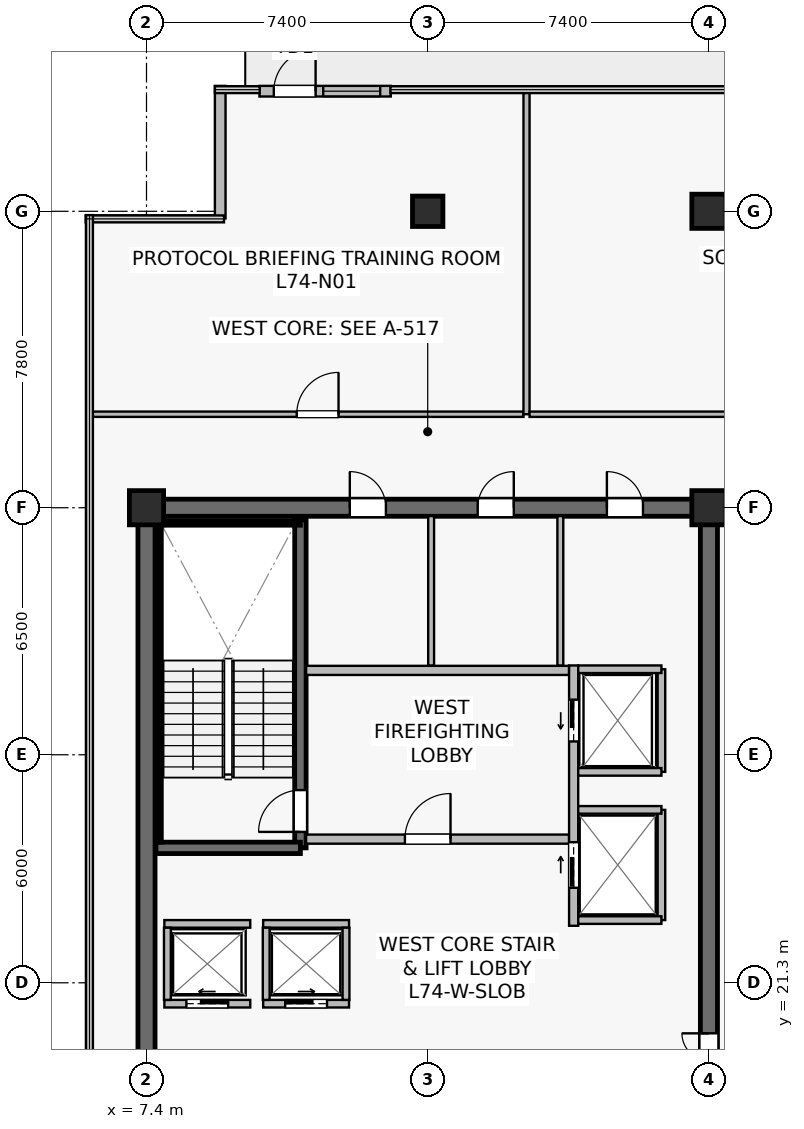
"""IFC4 building model, lengths in metres.
Left out: names, types, materials, properties, quantities, classifications, styles, units other than length and angle.
Written with IfcOpenShell. Run it as: python <this file> out.ifc"""

import sys

from ifc_helpers import new_model, si_unit, direction, frame, frame_2d, origin, origin_2d, place, context, subcontext, project, spatial, rectangle, extrude, source, transform, mapped, element, fill, save


model = new_model("IFC4")
c1 = context("Model", 3, precision=1e-05, world=origin(), true_north=direction((0.0, 1.0)))
c2 = subcontext(c1, "Body", "Model", "MODEL_VIEW")
j1 = project(units=[si_unit("LENGTHUNIT", "METRE"), si_unit("PLANEANGLEUNIT", "RADIAN")], contexts=[c1])
p1 = place(None, origin())
s1 = spatial("IfcSite", under=j1, at=p1, CompositionType="ELEMENT")
p2 = place(p1, origin())
s2 = spatial("IfcBuilding", under=s1, at=p2, CompositionType="ELEMENT")
p3 = place(p2, frame((0.0, 0.0, 310.2)))
s3 = spatial("IfcBuildingStorey", under=s2, at=p3, CompositionType="ELEMENT", Elevation=310.2)
p4 = place(p3, frame((7.175, 33.8, 0.0), z_axis=(0.0, 0.0, 1.0), x_axis=(1.0, 0.0, 0.0)))
e1 = element("IfcWall", 1, at=p4, inside=s3, PredefinedType="SHEAR", context=c2, shape_type="SweptSolid", body=[
    extrude(rectangle(XDim=15.25, YDim=0.45, at=frame_2d((7.625, 0.0))), origin(), (0.0, 0.0, 1.0), 3.9),
])
p5 = place(p4, frame((5.575, 0.0, 0.0)))
e2 = element("IfcOpeningElement", 2, at=p5, cuts=e1, PredefinedType="OPENING", context=c2, shape_type="SweptSolid", body=[
    extrude(rectangle(XDim=0.95, YDim=2.15, at=frame_2d((0.475, 1.075))), frame((0.0, 0.235, 0.0), z_axis=(0.0, -1.0, 0.0), x_axis=(1.0, 0.0, 0.0)), (0.0, 0.0, 1.0), 0.47),
])
p6 = place(p4, frame((8.94, 0.0, 0.0)))
e3 = element("IfcOpeningElement", 3, at=p6, cuts=e1, PredefinedType="OPENING", context=c2, shape_type="SweptSolid", body=[
    extrude(rectangle(XDim=0.95, YDim=2.15, at=frame_2d((0.475, 1.075))), frame((0.0, 0.235, 0.0), z_axis=(0.0, -1.0, 0.0), x_axis=(1.0, 0.0, 0.0)), (0.0, 0.0, 1.0), 0.47),
])
p7 = place(p4, frame((12.34, 0.0, 0.0)))
e4 = element("IfcOpeningElement", 4, at=p7, cuts=e1, PredefinedType="OPENING", context=c2, shape_type="SweptSolid", body=[
    extrude(rectangle(XDim=0.95, YDim=2.15, at=frame_2d((0.475, 1.075))), frame((0.0, 0.235, 0.0), z_axis=(0.0, -1.0, 0.0), x_axis=(1.0, 0.0, 0.0)), (0.0, 0.0, 1.0), 0.47),
])
p8 = place(p3, frame((7.4, 15.025, 0.0), z_axis=(0.0, 0.0, 1.0), x_axis=(0.0, 1.0, 0.0)))
e5 = element("IfcWall", 5, at=p8, inside=s3, PredefinedType="SHEAR", context=c2, shape_type="SweptSolid", body=[
    extrude(rectangle(XDim=18.55, YDim=0.45, at=frame_2d((9.275, 0.0))), origin(), (0.0, 0.0, 1.0), 3.9),
])
p9 = place(p3, frame((22.2, 15.025, 0.0), z_axis=(0.0, 0.0, 1.0), x_axis=(0.0, 1.0, 0.0)))
e6 = element("IfcWall", 6, at=p9, inside=s3, PredefinedType="SHEAR", context=c2, shape_type="SweptSolid", body=[
    extrude(rectangle(XDim=18.55, YDim=0.45, at=frame_2d((9.275, 0.0))), origin(), (0.0, 0.0, 1.0), 3.9),
])
p10 = place(p9, frame((3.525, 0.0, 0.0)))
e7 = element("IfcOpeningElement", 7, at=p10, cuts=e6, PredefinedType="OPENING", context=c2, shape_type="SweptSolid", body=[
    extrude(rectangle(XDim=1.42, YDim=2.2, at=frame_2d((0.71, 1.1))), frame((0.0, 0.235, 0.0), z_axis=(0.0, -1.0, 0.0), x_axis=(1.0, 0.0, 0.0)), (0.0, 0.0, 1.0), 0.47),
])
p11 = place(p3, frame((11.45, 24.85, 0.0), z_axis=(0.0, 0.0, 1.0), x_axis=(0.0, 1.0, 0.0)))
e8 = element("IfcWall", 8, at=p11, inside=s3, PredefinedType="SHEAR", context=c2, shape_type="SweptSolid", body=[
    extrude(rectangle(XDim=8.63, YDim=0.3, at=frame_2d((4.315, 0.0))), origin(), (0.0, 0.0, 1.0), 3.9),
])
p12 = place(p11, frame((0.42, 0.0, 0.0)))
e9 = element("IfcOpeningElement", 9, at=p12, cuts=e8, PredefinedType="OPENING", context=c2, shape_type="SweptSolid", body=[
    extrude(rectangle(XDim=1.1, YDim=2.15, at=frame_2d((0.55, 1.075))), frame((0.0, 0.16, 0.0), z_axis=(0.0, -1.0, 0.0), x_axis=(1.0, 0.0, 0.0)), (0.0, 0.0, 1.0), 0.32),
])
p13 = place(p3, frame((7.65, 24.85, 0.0), z_axis=(0.0, 0.0, 1.0), x_axis=(1.0, 0.0, 0.0)))
e10 = element("IfcWall", 10, at=p13, inside=s3, PredefinedType="SHEAR", context=c2, shape_type="SweptSolid", body=[
    extrude(rectangle(XDim=3.8, YDim=0.3, at=frame_2d((1.9, 0.0))), origin(), (0.0, 0.0, 1.0), 3.9),
])
p14 = place(p3, frame((7.73, 33.4, 0.0), z_axis=(0.0, 0.0, 1.0), x_axis=(1.0, 0.0, 0.0)))
e11 = element("IfcWall", 11, at=p14, inside=s3, PredefinedType="SOLIDWALL", context=c2, shape_type="SweptSolid", body=[
    extrude(rectangle(XDim=3.72, YDim=0.12, at=frame_2d((1.86, 0.0))), origin(), (0.0, 0.0, 1.0), 3.9),
])
p15 = place(p3, frame((7.73, 25.0, 0.0), z_axis=(0.0, 0.0, 1.0), x_axis=(0.0, 1.0, 0.0)))
e12 = element("IfcWall", 12, at=p15, inside=s3, PredefinedType="SOLIDWALL", context=c2, shape_type="SweptSolid", body=[
    extrude(rectangle(XDim=8.32, YDim=0.12, at=frame_2d((4.16, 0.0))), origin(), (0.0, 0.0, 1.0), 3.9),
])
m1 = source(origin(), c2, "Body", "SweptSolid", [
    extrude(rectangle(XDim=0.9, YDim=0.9, at=origin_2d()), origin(), (0.0, 0.0, 1.0), 4.2),
])
for number, where, z_axis, x_axis in (
    (13, (7.4, 33.8, 0.0), (0.0, 0.0, 1.0), (1.0, 0.0, 0.0)),
    (14, (22.2, 33.8, 0.0), (0.0, 0.0, 1.0), (1.0, 0.0, 0.0)),
):
    element("IfcColumn", number, at=place(p3, frame(where, z_axis=z_axis, x_axis=x_axis)), inside=s3, PredefinedType="COLUMN", context=c2, shape_type="MappedRepresentation", body=[
        mapped(m1, transform((0.0, 0.0, 0.0), scale=1.0)),
    ])
m2 = source(origin(), c2, "Body", "SweptSolid", [
    extrude(rectangle(XDim=0.8, YDim=0.8, at=origin_2d()), origin(), (0.0, 0.0, 1.0), 4.2),
])
p16 = place(p3, frame((14.8, 41.6, 0.0), z_axis=(0.0, 0.0, 1.0), x_axis=(1.0, 0.0, 0.0)))
e15 = element("IfcColumn", 15, at=p16, inside=s3, PredefinedType="COLUMN", context=c2, shape_type="MappedRepresentation", body=[
    mapped(m2, transform((0.0, 0.0, 0.0), scale=1.0)),
])
p17 = place(p3, frame((22.2, 41.6, 0.0), z_axis=(0.0, 0.0, 1.0), x_axis=(1.0, 0.0, 0.0)))
e16 = element("IfcColumn", 16, at=p17, inside=s3, PredefinedType="COLUMN", context=c2, shape_type="MappedRepresentation", body=[
    mapped(m1, transform((0.0, 0.0, 0.0), scale=1.0)),
])
p18 = place(p3, frame((10.372, 44.76, 0.0), z_axis=(0.0, 0.0, 1.0), x_axis=(1.0, 0.0, 0.0)))
e17 = element("IfcWall", 17, at=p18, inside=s3, PredefinedType="STANDARD", context=c2, shape_type="SweptSolid", body=[
    extrude(rectangle(XDim=3.456, YDim=0.28, at=frame_2d((1.728, 0.0))), origin(), (0.0, 0.0, 1.0), 3.9),
])
p19 = place(p18, frame((0.378, 0.0, 0.0)))
e18 = element("IfcOpeningElement", 18, at=p19, cuts=e17, PredefinedType="OPENING", context=c2, shape_type="SweptSolid", body=[
    extrude(rectangle(XDim=1.1, YDim=2.2, at=frame_2d((0.55, 1.1))), frame((0.0, 0.15, 0.0), z_axis=(0.0, -1.0, 0.0), x_axis=(1.0, 0.0, 0.0)), (0.0, 0.0, 1.0), 0.3),
])
p20 = place(p18, frame((1.678, 0.0, 0.9)))
e19 = element("IfcOpeningElement", 19, at=p20, cuts=e17, PredefinedType="OPENING", context=c2, shape_type="SweptSolid", body=[
    extrude(rectangle(XDim=1.5, YDim=2.2, at=frame_2d((0.75, 1.1))), frame((0.0, 0.15, 0.0), z_axis=(0.0, -1.0, 0.0), x_axis=(1.0, 0.0, 0.0)), (0.0, 0.0, 1.0), 0.3),
])
p21 = place(p3, frame((9.34, 44.9, 0.0), z_axis=(0.0, 0.0, 1.0), x_axis=(0.0, -1.0, 0.0)))
e20 = element("IfcWall", 20, at=p21, inside=s3, PredefinedType="STANDARD", context=c2, shape_type="SweptSolid", body=[
    extrude(rectangle(XDim=3.488, YDim=0.28, at=frame_2d((1.744, 0.0))), origin(), (0.0, 0.0, 1.0), 3.9),
])
p22 = place(p3, frame((11.6, 25.08, 0.0), z_axis=(0.0, 0.0, 1.0), x_axis=(1.0, 0.0, 0.0)))
e21 = element("IfcWall", 21, at=p22, inside=s3, PredefinedType="SOLIDWALL", context=c2, shape_type="SweptSolid", body=[
    extrude(rectangle(XDim=6.92, YDim=0.24, at=frame_2d((3.46, 0.0))), origin(), (0.0, 0.0, 1.0), 3.297),
])
p23 = place(p22, frame((2.6, 0.0, 0.0)))
e22 = element("IfcOpeningElement", 22, at=p23, cuts=e21, PredefinedType="OPENING", context=c2, shape_type="SweptSolid", body=[
    extrude(rectangle(XDim=1.2, YDim=2.16, at=frame_2d((0.6, 1.08))), frame((0.0, 0.13, 0.0), z_axis=(0.0, -1.0, 0.0), x_axis=(1.0, 0.0, 0.0)), (0.0, 0.0, 1.0), 0.26),
])
p24 = place(p3, frame((11.6, 29.52, 0.0), z_axis=(0.0, 0.0, 1.0), x_axis=(1.0, 0.0, 0.0)))
e23 = element("IfcWall", 23, at=p24, inside=s3, PredefinedType="SOLIDWALL", context=c2, shape_type="SweptSolid", body=[
    extrude(rectangle(XDim=6.92, YDim=0.24, at=frame_2d((3.46, 0.0))), origin(), (0.0, 0.0, 1.0), 3.297),
])
p25 = place(p3, frame((18.64, 22.8, 0.0), z_axis=(0.0, 0.0, 1.0), x_axis=(0.0, 1.0, 0.0)))
e24 = element("IfcWall", 24, at=p25, inside=s3, PredefinedType="SOLIDWALL", context=c2, shape_type="SweptSolid", body=[
    extrude(rectangle(XDim=6.85, YDim=0.24, at=frame_2d((3.425, 0.0))), origin(), (0.0, 0.0, 1.0), 3.035),
])
p26 = place(p25, frame((4.85, 0.0, 0.0)))
e25 = element("IfcOpeningElement", 25, at=p26, cuts=e24, PredefinedType="OPENING", context=c2, shape_type="SweptSolid", body=[
    extrude(rectangle(XDim=1.1, YDim=2.22, at=frame_2d((0.55, 1.11))), frame((0.0, 0.13, 0.0), z_axis=(0.0, -1.0, 0.0), x_axis=(1.0, 0.0, 0.0)), (0.0, 0.0, 1.0), 0.26),
])
p27 = place(p25, frame((1.0, 0.0, 0.0)))
e26 = element("IfcOpeningElement", 26, at=p27, cuts=e24, PredefinedType="OPENING", context=c2, shape_type="SweptSolid", body=[
    extrude(rectangle(XDim=1.2, YDim=2.22, at=frame_2d((0.6, 1.11))), frame((0.0, 0.13, 0.0), z_axis=(0.0, -1.0, 0.0), x_axis=(1.0, 0.0, 0.0)), (0.0, 0.0, 1.0), 0.26),
])
p28 = place(p3, frame((7.87, 20.75, 0.0), z_axis=(0.0, 0.0, 1.0), x_axis=(1.0, 0.0, 0.0)))
e27 = element("IfcWall", 27, at=p28, inside=s3, PredefinedType="SOLIDWALL", context=c2, shape_type="SweptSolid", body=[
    extrude(rectangle(XDim=2.26, YDim=0.2, at=frame_2d((1.13, 0.0))), origin(), (0.0, 0.0, 1.0), 3.9),
])
p29 = place(p28, frame((0.58, 0.0, 0.0)))
e28 = element("IfcOpeningElement", 28, at=p29, cuts=e27, PredefinedType="OPENING", context=c2, shape_type="SweptSolid", body=[
    extrude(rectangle(XDim=1.1, YDim=2.22, at=frame_2d((0.55, 1.11))), frame((0.0, 0.11, 0.0), z_axis=(0.0, -1.0, 0.0), x_axis=(1.0, 0.0, 0.0)), (0.0, 0.0, 1.0), 0.22),
])
p30 = place(p3, frame((7.87, 22.85, 0.0), z_axis=(0.0, 0.0, 1.0), x_axis=(1.0, 0.0, 0.0)))
e29 = element("IfcWall", 29, at=p30, inside=s3, PredefinedType="SOLIDWALL", context=c2, shape_type="SweptSolid", body=[
    extrude(rectangle(XDim=2.26, YDim=0.2, at=frame_2d((1.13, 0.0))), origin(), (0.0, 0.0, 1.0), 3.9),
])
p31 = place(p3, frame((7.95, 20.85, 0.0), z_axis=(0.0, 0.0, 1.0), x_axis=(0.0, 1.0, 0.0)))
e30 = element("IfcWall", 30, at=p31, inside=s3, PredefinedType="SOLIDWALL", context=c2, shape_type="SweptSolid", body=[
    extrude(rectangle(XDim=1.9, YDim=0.18, at=frame_2d((0.95, 0.0))), origin(), (0.0, 0.0, 1.0), 3.9),
])
p32 = place(p3, frame((10.47, 20.75, 0.0), z_axis=(0.0, 0.0, 1.0), x_axis=(1.0, 0.0, 0.0)))
e31 = element("IfcWall", 31, at=p32, inside=s3, PredefinedType="SOLIDWALL", context=c2, shape_type="SweptSolid", body=[
    extrude(rectangle(XDim=2.26, YDim=0.2, at=frame_2d((1.13, 0.0))), origin(), (0.0, 0.0, 1.0), 3.9),
])
p33 = place(p32, frame((0.58, 0.0, 0.0)))
e32 = element("IfcOpeningElement", 32, at=p33, cuts=e31, PredefinedType="OPENING", context=c2, shape_type="SweptSolid", body=[
    extrude(rectangle(XDim=1.1, YDim=2.22, at=frame_2d((0.55, 1.11))), frame((0.0, 0.11, 0.0), z_axis=(0.0, -1.0, 0.0), x_axis=(1.0, 0.0, 0.0)), (0.0, 0.0, 1.0), 0.22),
])
p34 = place(p3, frame((10.47, 22.85, 0.0), z_axis=(0.0, 0.0, 1.0), x_axis=(1.0, 0.0, 0.0)))
e33 = element("IfcWall", 33, at=p34, inside=s3, PredefinedType="SOLIDWALL", context=c2, shape_type="SweptSolid", body=[
    extrude(rectangle(XDim=2.26, YDim=0.2, at=frame_2d((1.13, 0.0))), origin(), (0.0, 0.0, 1.0), 3.9),
])
for number, where, z_axis, x_axis in (
    (34, (10.55, 20.85, 0.0), (0.0, 0.0, 1.0), (0.0, 1.0, 0.0)),
    (35, (12.65, 20.85, 0.0), (0.0, 0.0, 1.0), (0.0, 1.0, 0.0)),
):
    element("IfcWall", number, at=place(p3, frame(where, z_axis=z_axis, x_axis=x_axis)), inside=s3, PredefinedType="SOLIDWALL", context=c2, shape_type="SweptSolid", body=[
        extrude(rectangle(XDim=1.9, YDim=0.18, at=frame_2d((0.95, 0.0))), origin(), (0.0, 0.0, 1.0), 3.9),
    ])
p35 = place(p3, frame((20.95, 26.85, 0.0), z_axis=(0.0, 0.0, 1.0), x_axis=(0.0, 1.0, 0.0)))
e36 = element("IfcWall", 36, at=p35, inside=s3, PredefinedType="SOLIDWALL", context=c2, shape_type="SweptSolid", body=[
    extrude(rectangle(XDim=2.7, YDim=0.2, at=frame_2d((1.35, 0.0))), origin(), (0.0, 0.0, 1.0), 3.9),
])
p36 = place(p3, frame((18.76, 29.55, 0.0), z_axis=(0.0, 0.0, 1.0), x_axis=(1.0, 0.0, 0.0)))
e37 = element("IfcWall", 37, at=p36, inside=s3, PredefinedType="SOLIDWALL", context=c2, shape_type="SweptSolid", body=[
    extrude(rectangle(XDim=2.19, YDim=0.2, at=frame_2d((1.095, 0.0))), origin(), (0.0, 0.0, 1.0), 3.9),
])
p37 = place(p3, frame((18.76, 26.85, 0.0), z_axis=(0.0, 0.0, 1.0), x_axis=(1.0, 0.0, 0.0)))
e38 = element("IfcWall", 38, at=p37, inside=s3, PredefinedType="SOLIDWALL", context=c2, shape_type="SweptSolid", body=[
    extrude(rectangle(XDim=2.19, YDim=0.2, at=frame_2d((1.095, 0.0))), origin(), (0.0, 0.0, 1.0), 3.297),
])
p38 = place(p3, frame((20.95, 22.95, 0.0), z_axis=(0.0, 0.0, 1.0), x_axis=(0.0, 1.0, 0.0)))
e39 = element("IfcWall", 39, at=p38, inside=s3, PredefinedType="SOLIDWALL", context=c2, shape_type="SweptSolid", body=[
    extrude(rectangle(XDim=2.9, YDim=0.2, at=frame_2d((1.45, 0.0))), origin(), (0.0, 0.0, 1.0), 3.035),
])
for number, where, z_axis, x_axis in (
    (40, (18.76, 25.85, 0.0), (0.0, 0.0, 1.0), (1.0, 0.0, 0.0)),
    (41, (18.76, 22.95, 0.0), (0.0, 0.0, 1.0), (1.0, 0.0, 0.0)),
):
    element("IfcWall", number, at=place(p3, frame(where, z_axis=z_axis, x_axis=x_axis)), inside=s3, PredefinedType="SOLIDWALL", context=c2, shape_type="SweptSolid", body=[
        extrude(rectangle(XDim=2.19, YDim=0.2, at=frame_2d((1.095, 0.0))), origin(), (0.0, 0.0, 1.0), 3.9),
    ])
p39 = place(p3, frame((14.89, 29.65, 0.0), z_axis=(0.0, 0.0, 1.0), x_axis=(0.0, 1.0, 0.0)))
e42 = element("IfcWall", 42, at=p39, inside=s3, PredefinedType="PLUMBINGWALL", context=c2, shape_type="SweptSolid", body=[
    extrude(rectangle(XDim=3.93, YDim=0.155, at=frame_2d((1.965, 0.0))), origin(), (0.0, 0.0, 1.0), 3.297),
])
p40 = place(p3, frame((18.29, 29.65, 0.0), z_axis=(0.0, 0.0, 1.0), x_axis=(0.0, 1.0, 0.0)))
e43 = element("IfcWall", 43, at=p40, inside=s3, PredefinedType="PLUMBINGWALL", context=c2, shape_type="SweptSolid", body=[
    extrude(rectangle(XDim=3.93, YDim=0.155, at=frame_2d((1.965, 0.0))), origin(), (0.0, 0.0, 1.0), 3.9),
])
p41 = place(p3, frame((5.91, 36.26, 0.0), z_axis=(0.0, 0.0, 1.0), x_axis=(1.0, 0.0, 0.0)))
e44 = element("IfcWall", 44, at=p41, inside=s3, PredefinedType="PARTITIONING", context=c2, shape_type="SweptSolid", body=[
    extrude(rectangle(XDim=11.41, YDim=0.14, at=frame_2d((5.705, 0.0))), origin(), (0.0, 0.0, 1.0), 3.297),
])
p42 = place(p41, frame((5.443, 0.0, 0.0)))
e45 = element("IfcOpeningElement", 45, at=p42, cuts=e44, PredefinedType="OPENING", context=c2, shape_type="SweptSolid", body=[
    extrude(rectangle(XDim=1.1, YDim=2.18, at=frame_2d((0.55, 1.09))), frame((0.0, 0.08, 0.0), z_axis=(0.0, -1.0, 0.0), x_axis=(1.0, 0.0, 0.0)), (0.0, 0.0, 1.0), 0.16),
])
p43 = place(p3, frame((17.4, 36.26, 0.0), z_axis=(0.0, 0.0, 1.0), x_axis=(0.0, 1.0, 0.0)))
e46 = element("IfcWall", 46, at=p43, inside=s3, PredefinedType="PARTITIONING", context=c2, shape_type="SweptSolid", body=[
    extrude(rectangle(XDim=8.53, YDim=0.16, at=frame_2d((4.265, 0.0))), origin(), (0.0, 0.0, 1.0), 3.235),
])
p44 = place(p3, frame((17.48, 36.26, 0.0), z_axis=(0.0, 0.0, 1.0), x_axis=(1.0, 0.0, 0.0)))
e47 = element("IfcWall", 47, at=p44, inside=s3, PredefinedType="PARTITIONING", context=c2, shape_type="SweptSolid", body=[
    extrude(rectangle(XDim=17.24, YDim=0.14, at=frame_2d((8.62, 0.0))), origin(), (0.0, 0.0, 1.0), 3.297),
])
p45 = place(p44, frame((6.68, 0.0, 0.0)))
e48 = element("IfcOpeningElement", 48, at=p45, cuts=e47, PredefinedType="OPENING", context=c2, shape_type="SweptSolid", body=[
    extrude(rectangle(XDim=1.1, YDim=2.18, at=frame_2d((0.55, 1.09))), frame((0.0, 0.08, 0.0), z_axis=(0.0, -1.0, 0.0), x_axis=(1.0, 0.0, 0.0)), (0.0, 0.0, 1.0), 0.16),
])
m3 = source(origin(), c2, "Body", "SweptSolid", [
    extrude(rectangle(XDim=1.1, YDim=2.2, at=frame_2d((0.55, 1.1))), frame((0.0, 0.025, 0.0), z_axis=(0.0, -1.0, 0.0), x_axis=(1.0, 0.0, 0.0)), (0.0, 0.0, 1.0), 0.05),
])
p46 = place(p19, origin())
e49 = element("IfcDoor", 49, at=p46, inside=s3, OperationType="SINGLE_SWING_RIGHT", PredefinedType="DOOR", context=c2, shape_type="MappedRepresentation", body=[
    mapped(m3, transform((0.0, 0.0, 0.0), scale=1.0)),
])
fill(e18, e49)
m4 = source(origin(), c2, "Body", "SweptSolid", [
    extrude(rectangle(XDim=1.5, YDim=2.2, at=frame_2d((0.75, 1.1))), frame((0.0, 0.03, 0.0), z_axis=(0.0, -1.0, 0.0), x_axis=(1.0, 0.0, 0.0)), (0.0, 0.0, 1.0), 0.06),
])
p47 = place(p20, origin())
e50 = element("IfcWindow", 50, at=p47, inside=s3, PartitioningType="SINGLE_PANEL", PredefinedType="WINDOW", context=c2, shape_type="MappedRepresentation", body=[
    mapped(m4, transform((0.0, 0.0, 0.0), scale=1.0)),
])
fill(e19, e50)
m5 = source(origin(), c2, "Body", "SweptSolid", [
    extrude(rectangle(XDim=1.1, YDim=2.15, at=frame_2d((0.55, 1.075))), frame((0.0, 0.025, 0.0), z_axis=(0.0, -1.0, 0.0), x_axis=(1.0, 0.0, 0.0)), (0.0, 0.0, 1.0), 0.05),
])
p48 = place(p12, origin())
e51 = element("IfcDoor", 51, at=p48, inside=s3, OperationType="SINGLE_SWING_LEFT", PredefinedType="DOOR", context=c2, shape_type="MappedRepresentation", body=[
    mapped(m5, transform((0.0, 0.0, 0.0), scale=1.0)),
])
fill(e9, e51)
m6 = source(origin(), c2, "Body", "SweptSolid", [
    extrude(rectangle(XDim=1.2, YDim=2.16, at=frame_2d((0.6, 1.08))), frame((0.0, 0.025, 0.0), z_axis=(0.0, -1.0, 0.0), x_axis=(1.0, 0.0, 0.0)), (0.0, 0.0, 1.0), 0.05),
])
p49 = place(p23, origin())
e52 = element("IfcDoor", 52, at=p49, inside=s3, OperationType="SINGLE_SWING_RIGHT", PredefinedType="DOOR", context=c2, shape_type="MappedRepresentation", body=[
    mapped(m6, transform((0.0, 0.0, 0.0), scale=1.0)),
])
fill(e22, e52)
m7 = source(origin(), c2, "Body", "SweptSolid", [
    extrude(rectangle(XDim=1.1, YDim=2.22, at=frame_2d((0.55, 1.11))), frame((0.0, 0.025, 0.0), z_axis=(0.0, -1.0, 0.0), x_axis=(1.0, 0.0, 0.0)), (0.0, 0.0, 1.0), 0.05),
])
p50 = place(p29, origin())
e53 = element("IfcDoor", 53, at=p50, inside=s3, OperationType="SLIDING_TO_LEFT", PredefinedType="USERDEFINED", context=c2, shape_type="MappedRepresentation", body=[
    mapped(m7, transform((0.0, 0.0, 0.0), scale=1.0)),
])
fill(e28, e53)
p51 = place(p33, origin())
e54 = element("IfcDoor", 54, at=p51, inside=s3, OperationType="SLIDING_TO_RIGHT", PredefinedType="USERDEFINED", context=c2, shape_type="MappedRepresentation", body=[
    mapped(m7, transform((0.0, 0.0, 0.0), scale=1.0)),
])
fill(e32, e54)
p52 = place(p26, origin())
e55 = element("IfcDoor", 55, at=p52, inside=s3, OperationType="SLIDING_TO_LEFT", PredefinedType="USERDEFINED", context=c2, shape_type="MappedRepresentation", body=[
    mapped(m7, transform((0.0, 0.0, 0.0), scale=1.0)),
])
fill(e25, e55)
m8 = source(origin(), c2, "Body", "SweptSolid", [
    extrude(rectangle(XDim=1.2, YDim=2.22, at=frame_2d((0.6, 1.11))), frame((0.0, 0.025, 0.0), z_axis=(0.0, -1.0, 0.0), x_axis=(1.0, 0.0, 0.0)), (0.0, 0.0, 1.0), 0.05),
])
p53 = place(p27, origin())
e56 = element("IfcDoor", 56, at=p53, inside=s3, OperationType="SLIDING_TO_RIGHT", PredefinedType="USERDEFINED", context=c2, shape_type="MappedRepresentation", body=[
    mapped(m8, transform((0.0, 0.0, 0.0), scale=1.0)),
])
fill(e26, e56)
m9 = source(origin(), c2, "Body", "SweptSolid", [
    extrude(rectangle(XDim=1.42, YDim=2.2, at=frame_2d((0.71, 1.1))), frame((0.0, 0.025, 0.0), z_axis=(0.0, -1.0, 0.0), x_axis=(1.0, 0.0, 0.0)), (0.0, 0.0, 1.0), 0.05),
])
p54 = place(p10, origin())
e57 = element("IfcDoor", 57, at=p54, inside=s3, OperationType="DOUBLE_DOOR_SINGLE_SWING", PredefinedType="DOOR", context=c2, shape_type="MappedRepresentation", body=[
    mapped(m9, transform((0.0, 0.0, 0.0), scale=1.0)),
])
fill(e7, e57)
m10 = source(origin(), c2, "Body", "SweptSolid", [
    extrude(rectangle(XDim=0.95, YDim=2.15, at=frame_2d((0.475, 1.075))), frame((0.0, 0.025, 0.0), z_axis=(0.0, -1.0, 0.0), x_axis=(1.0, 0.0, 0.0)), (0.0, 0.0, 1.0), 0.05),
])
p55 = place(p5, origin())
e58 = element("IfcDoor", 58, at=p55, inside=s3, OperationType="SINGLE_SWING_LEFT", PredefinedType="DOOR", context=c2, shape_type="MappedRepresentation", body=[
    mapped(m10, transform((0.0, 0.0, 0.0), scale=1.0)),
])
fill(e2, e58)
p56 = place(p6, origin())
e59 = element("IfcDoor", 59, at=p56, inside=s3, OperationType="SINGLE_SWING_RIGHT", PredefinedType="DOOR", context=c2, shape_type="MappedRepresentation", body=[
    mapped(m10, transform((0.0, 0.0, 0.0), scale=1.0)),
])
fill(e3, e59)
p57 = place(p7, origin())
e60 = element("IfcDoor", 60, at=p57, inside=s3, OperationType="SINGLE_SWING_LEFT", PredefinedType="DOOR", context=c2, shape_type="MappedRepresentation", body=[
    mapped(m10, transform((0.0, 0.0, 0.0), scale=1.0)),
])
fill(e4, e60)
m11 = source(origin(), c2, "Body", "SweptSolid", [
    extrude(rectangle(XDim=1.1, YDim=2.18, at=frame_2d((0.55, 1.09))), frame((0.0, 0.025, 0.0), z_axis=(0.0, -1.0, 0.0), x_axis=(1.0, 0.0, 0.0)), (0.0, 0.0, 1.0), 0.05),
])
p58 = place(p42, origin())
e61 = element("IfcDoor", 61, at=p58, inside=s3, OperationType="SINGLE_SWING_RIGHT", PredefinedType="DOOR", context=c2, shape_type="MappedRepresentation", body=[
    mapped(m11, transform((0.0, 0.0, 0.0), scale=1.0)),
])
fill(e45, e61)
save(model, sys.argv[1])
